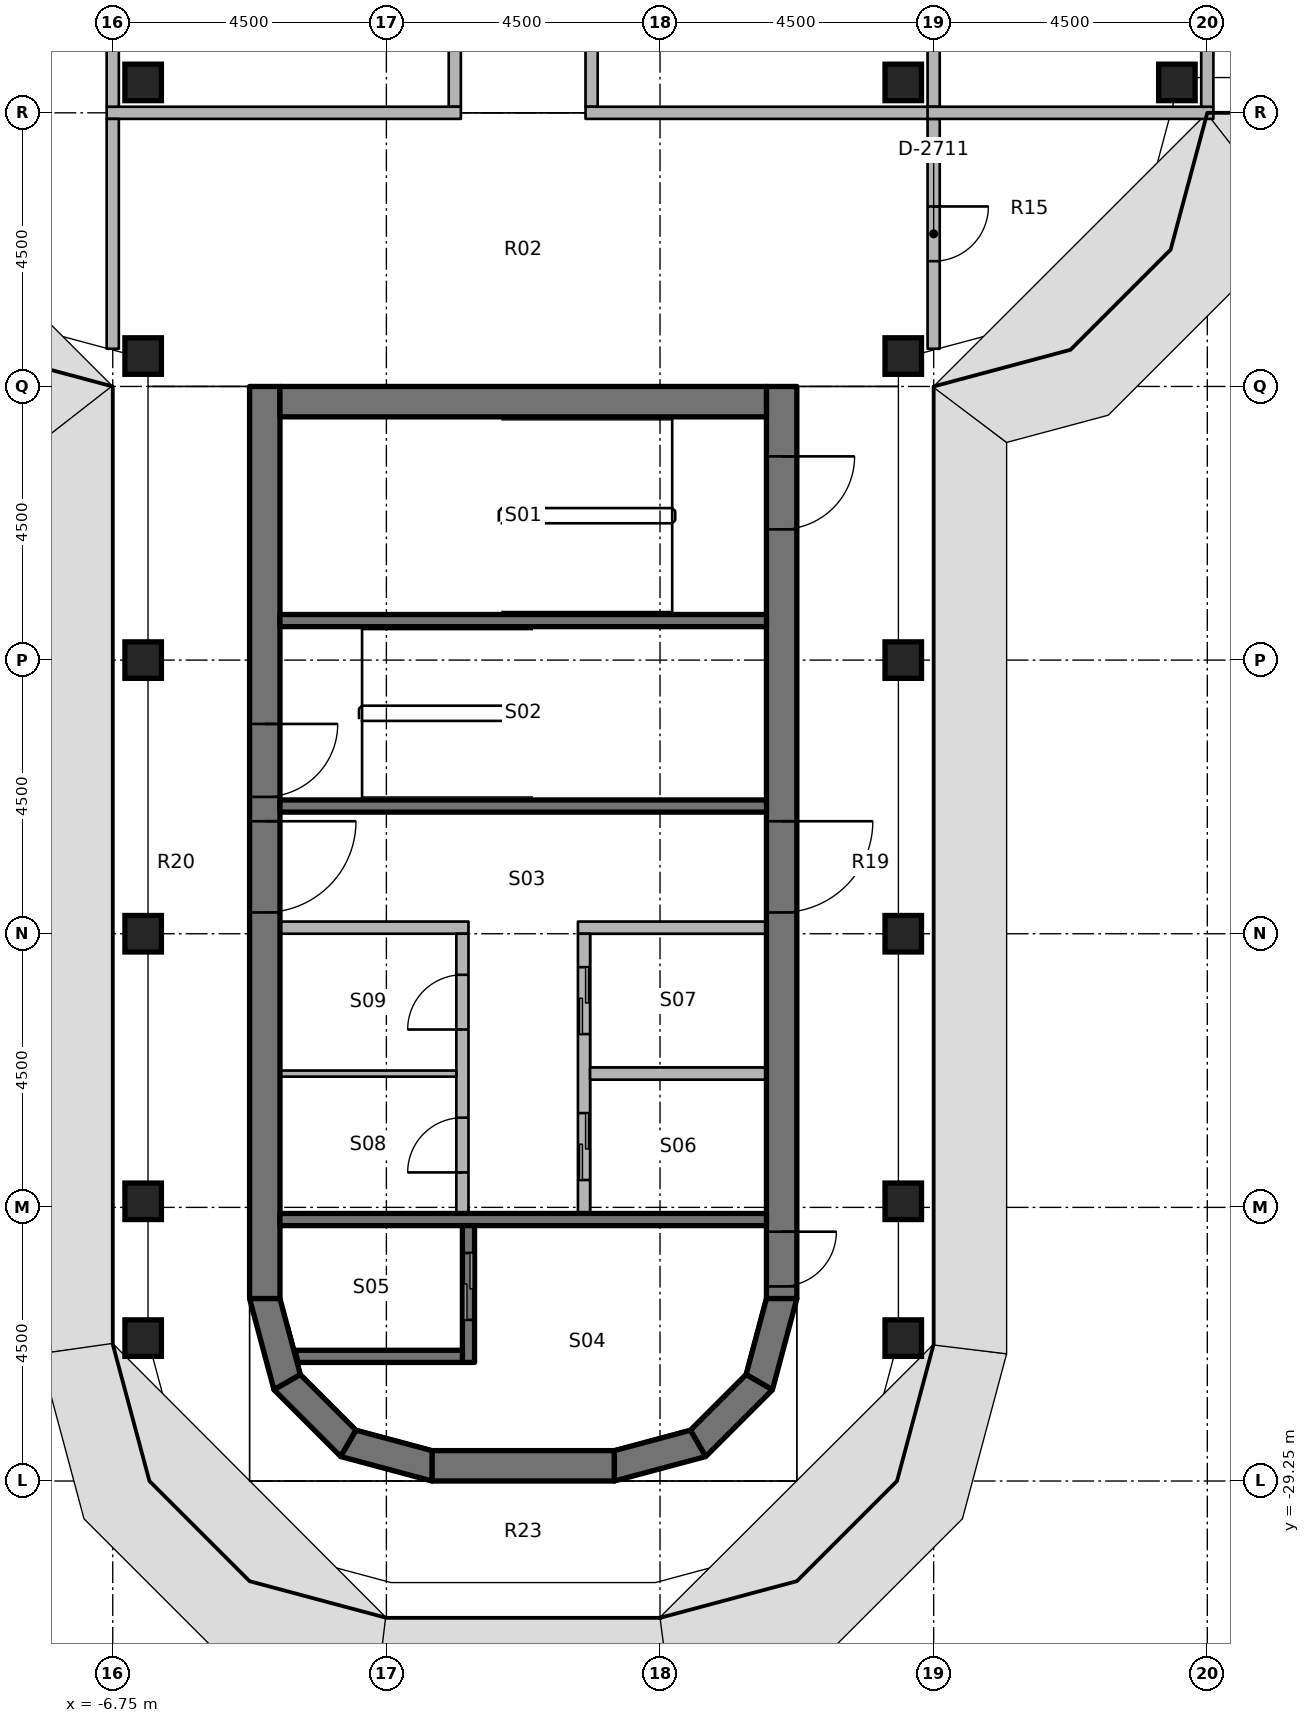
"""IFC4 building model, lengths in metres.
Left out: names, types, materials, properties, quantities, classifications, styles, units other than length and angle.
Written with IfcOpenShell. Run it as: python <this file> out.ifc"""

import sys

from ifc_helpers import new_model, si_unit, direction, frame, frame_2d, origin, origin_2d, place, context, subcontext, project, spatial, polyline, rectangle, outline, extrude, element, fill, save


model = new_model("IFC4")
c1 = context("Model", 3, precision=1e-05, world=origin(), true_north=direction((0.0, 1.0)))
c2 = subcontext(c1, "Body", "Model", "MODEL_VIEW")
j1 = project(units=[si_unit("LENGTHUNIT", "METRE"), si_unit("PLANEANGLEUNIT", "RADIAN")], contexts=[c1])
p1 = place(None, origin())
s1 = spatial("IfcSite", under=j1, at=p1, CompositionType="ELEMENT")
p2 = place(p1, origin())
s2 = spatial("IfcBuilding", under=s1, at=p2, CompositionType="ELEMENT")
p3 = place(p2, frame((0.0, 0.0, 253.6)))
s3 = spatial("IfcBuildingStorey", under=s2, at=p3, CompositionType="ELEMENT", Elevation=253.6)
for number, where, z_axis, x_axis in (
    (1, (-6.25, -26.9, 0.0), (0.0, 0.0, 1.0), (1.0, 0.0, 0.0)),
    (2, (-6.25, -24.65, 0.0), (0.0, 0.0, 1.0), (1.0, 0.0, 0.0)),
    (3, (-6.25, -20.25, 0.0), (0.0, 0.0, 1.0), (1.0, 0.0, 0.0)),
    (4, (-6.25, -15.75, 0.0), (0.0, 0.0, 1.0), (1.0, 0.0, 0.0)),
    (5, (-6.25, -10.75, 0.0), (0.0, 0.0, 1.0), (1.0, 0.0, 0.0)),
    (6, (-6.25, -6.25, 0.0), (0.0, 0.0, 1.0), (1.0, 0.0, 0.0)),
    (7, (6.25, -26.9, 0.0), (0.0, 0.0, 1.0), (1.0, 0.0, 0.0)),
    (8, (6.25, -24.65, 0.0), (0.0, 0.0, 1.0), (1.0, 0.0, 0.0)),
    (9, (6.25, -20.25, 0.0), (0.0, 0.0, 1.0), (1.0, 0.0, 0.0)),
    (10, (6.25, -15.75, 0.0), (0.0, 0.0, 1.0), (1.0, 0.0, 0.0)),
    (11, (6.25, -10.75, 0.0), (0.0, 0.0, 1.0), (1.0, 0.0, 0.0)),
    (12, (6.25, -6.25, 0.0), (0.0, 0.0, 1.0), (1.0, 0.0, 0.0)),
    (13, (10.75, -6.25, 0.0), (0.0, 0.0, 1.0), (1.0, 0.0, 0.0)),
):
    element("IfcColumn", number, at=place(p3, frame(where, z_axis=z_axis, x_axis=x_axis)), inside=s3, PredefinedType="COLUMN", context=c2, shape_type="SweptSolid", body=[
        extrude(rectangle(XDim=0.6, YDim=0.6, at=origin_2d()), origin(), (0.0, 0.0, 1.0), 3.65),
    ])
p4 = place(p3, frame((-4.25, -11.25, 0.0), z_axis=(0.0, 0.0, 1.0), x_axis=(0.0, -1.0, 0.0)))
e14 = element("IfcWall", 14, at=p4, inside=s3, PredefinedType="SHEAR", context=c2, shape_type="SweptSolid", body=[
    extrude(rectangle(XDim=15.0, YDim=0.5, at=frame_2d((7.5, 0.0))), origin(), (0.0, 0.0, 1.0), 3.8),
])
p5 = place(p4, frame((7.15, 0.0, 0.0)))
e15 = element("IfcOpeningElement", 15, at=p5, cuts=e14, PredefinedType="OPENING", context=c2, shape_type="SweptSolid", body=[
    extrude(rectangle(XDim=1.5, YDim=2.3, at=frame_2d((0.75, 1.15))), frame((0.0, 0.26, 0.0), z_axis=(0.0, -1.0, 0.0), x_axis=(1.0, 0.0, 0.0)), (0.0, 0.0, 1.0), 0.52),
])
p6 = place(p4, frame((5.55, 0.0, 0.0)))
e16 = element("IfcOpeningElement", 16, at=p6, cuts=e14, PredefinedType="OPENING", context=c2, shape_type="SweptSolid", body=[
    extrude(rectangle(XDim=1.2, YDim=2.1, at=frame_2d((0.6, 1.05))), frame((0.0, 0.26, 0.0), z_axis=(0.0, -1.0, 0.0), x_axis=(1.0, 0.0, 0.0)), (0.0, 0.0, 1.0), 0.52),
])
p7 = place(p3, frame((4.25, -11.25, 0.0), z_axis=(0.0, 0.0, 1.0), x_axis=(0.0, -1.0, 0.0)))
e17 = element("IfcWall", 17, at=p7, inside=s3, PredefinedType="SHEAR", context=c2, shape_type="SweptSolid", body=[
    extrude(rectangle(XDim=15.0, YDim=0.5, at=frame_2d((7.5, 0.0))), origin(), (0.0, 0.0, 1.0), 3.8),
])
p8 = place(p7, frame((7.15, 0.0, 0.0)))
e18 = element("IfcOpeningElement", 18, at=p8, cuts=e17, PredefinedType="OPENING", context=c2, shape_type="SweptSolid", body=[
    extrude(rectangle(XDim=1.5, YDim=2.3, at=frame_2d((0.75, 1.15))), frame((0.0, 0.26, 0.0), z_axis=(0.0, -1.0, 0.0), x_axis=(1.0, 0.0, 0.0)), (0.0, 0.0, 1.0), 0.52),
])
p9 = place(p7, frame((13.9, 0.0, 0.0)))
e19 = element("IfcOpeningElement", 19, at=p9, cuts=e17, PredefinedType="OPENING", context=c2, shape_type="SweptSolid", body=[
    extrude(rectangle(XDim=0.9, YDim=2.1, at=frame_2d((0.45, 1.05))), frame((0.0, 0.26, 0.0), z_axis=(0.0, -1.0, 0.0), x_axis=(1.0, 0.0, 0.0)), (0.0, 0.0, 1.0), 0.52),
])
p10 = place(p7, frame((1.15, 0.0, 0.0)))
e20 = element("IfcOpeningElement", 20, at=p10, cuts=e17, PredefinedType="OPENING", context=c2, shape_type="SweptSolid", body=[
    extrude(rectangle(XDim=1.2, YDim=2.1, at=frame_2d((0.6, 1.05))), frame((0.0, 0.26, 0.0), z_axis=(0.0, -1.0, 0.0), x_axis=(1.0, 0.0, 0.0)), (0.0, 0.0, 1.0), 0.52),
])
p11 = place(p3, frame((-4.0, -11.5, 0.0), z_axis=(0.0, 0.0, 1.0), x_axis=(1.0, 0.0, 0.0)))
e21 = element("IfcWall", 21, at=p11, inside=s3, PredefinedType="SHEAR", context=c2, shape_type="SweptSolid", body=[
    extrude(rectangle(XDim=8.0, YDim=0.5, at=frame_2d((4.0, 0.0))), origin(), (0.0, 0.0, 1.0), 3.8),
])
p12 = place(p3, frame((-1.5, -29.0, 0.0), z_axis=(0.0, 0.0, 1.0), x_axis=(1.0, 0.0, 0.0)))
e22 = element("IfcWall", 22, at=p12, inside=s3, PredefinedType="SHEAR", context=c2, shape_type="SweptSolid", body=[
    extrude(rectangle(XDim=3.0, YDim=0.5, at=frame_2d((1.5, 0.0))), origin(), (0.0, 0.0, 1.0), 3.8),
])
p13 = place(p3, origin())
e23 = element("IfcWall", 23, at=p13, inside=s3, PredefinedType="SHEAR", context=c2, shape_type="SweptSolid", body=[
    extrude(outline(polyline([(-4.5, -26.25), (-4.098, -27.75), (-3.665, -27.5), (-4.0, -26.25), (-4.5, -26.25)])), origin(), (0.0, 0.0, 1.0), 3.8),
])
p14 = place(p3, origin())
e24 = element("IfcWall", 24, at=p14, inside=s3, PredefinedType="SHEAR", context=c2, shape_type="SweptSolid", body=[
    extrude(outline(polyline([(-4.098, -27.75), (-3.0, -28.848), (-2.75, -28.415), (-3.665, -27.5), (-4.098, -27.75)])), origin(), (0.0, 0.0, 1.0), 3.8),
])
p15 = place(p3, origin())
e25 = element("IfcWall", 25, at=p15, inside=s3, PredefinedType="SHEAR", context=c2, shape_type="SweptSolid", body=[
    extrude(outline(polyline([(-3.0, -28.848), (-1.5, -29.25), (-1.5, -28.75), (-2.75, -28.415), (-3.0, -28.848)])), origin(), (0.0, 0.0, 1.0), 3.8),
])
p16 = place(p3, origin())
e26 = element("IfcWall", 26, at=p16, inside=s3, PredefinedType="SHEAR", context=c2, shape_type="SweptSolid", body=[
    extrude(outline(polyline([(4.5, -26.25), (4.098, -27.75), (3.665, -27.5), (4.0, -26.25), (4.5, -26.25)])), origin(), (0.0, 0.0, 1.0), 3.8),
])
p17 = place(p3, origin())
e27 = element("IfcWall", 27, at=p17, inside=s3, PredefinedType="SHEAR", context=c2, shape_type="SweptSolid", body=[
    extrude(outline(polyline([(4.098, -27.75), (3.0, -28.848), (2.75, -28.415), (3.665, -27.5), (4.098, -27.75)])), origin(), (0.0, 0.0, 1.0), 3.8),
])
p18 = place(p3, origin())
e28 = element("IfcWall", 28, at=p18, inside=s3, PredefinedType="SHEAR", context=c2, shape_type="SweptSolid", body=[
    extrude(outline(polyline([(3.0, -28.848), (1.5, -29.25), (1.5, -28.75), (2.75, -28.415), (3.0, -28.848)])), origin(), (0.0, 0.0, 1.0), 3.8),
])
p19 = place(p3, frame((4.0, -24.95, 0.0), z_axis=(0.0, 0.0, 1.0), x_axis=(-1.0, 0.0, 0.0)))
e29 = element("IfcWall", 29, at=p19, inside=s3, PredefinedType="SHEAR", context=c2, shape_type="SweptSolid", body=[
    extrude(rectangle(XDim=8.0, YDim=0.2, at=frame_2d((4.0, 0.0))), origin(), (0.0, 0.0, 1.0), 3.65),
])
p20 = place(p3, frame((-0.9, -27.3, 0.0), z_axis=(0.0, 0.0, 1.0), x_axis=(0.0, 1.0, 0.0)))
e30 = element("IfcWall", 30, at=p20, inside=s3, PredefinedType="SHEAR", context=c2, shape_type="SweptSolid", body=[
    extrude(rectangle(XDim=2.25, YDim=0.2, at=frame_2d((1.125, 0.0))), origin(), (0.0, 0.0, 1.0), 3.65),
])
p21 = place(p20, frame((0.7, 0.0, 0.0)))
e31 = element("IfcOpeningElement", 31, at=p21, cuts=e30, PredefinedType="OPENING", context=c2, shape_type="SweptSolid", body=[
    extrude(rectangle(XDim=1.1, YDim=2.3, at=frame_2d((0.55, 1.15))), frame((0.0, 0.11, 0.0), z_axis=(0.0, -1.0, 0.0), x_axis=(1.0, 0.0, 0.0)), (0.0, 0.0, 1.0), 0.22),
])
p22 = place(p3, origin())
e32 = element("IfcWall", 32, at=p22, inside=s3, PredefinedType="SHEAR", context=c2, shape_type="SweptSolid", body=[
    extrude(outline(polyline([(-1.0, -27.1), (-3.755, -27.1), (-3.701, -27.3), (-1.0, -27.3), (-1.0, -27.1)])), origin(), (0.0, 0.0, 1.0), 3.65),
])
for number, where, z_axis, x_axis in (
    (33, (4.0, -18.15, 0.0), (0.0, 0.0, 1.0), (-1.0, 0.0, 0.0)),
    (34, (4.0, -15.1, 0.0), (0.0, 0.0, 1.0), (-1.0, 0.0, 0.0)),
):
    element("IfcWall", number, at=place(p3, frame(where, z_axis=z_axis, x_axis=x_axis)), inside=s3, PredefinedType="SHEAR", context=c2, shape_type="SweptSolid", body=[
        extrude(rectangle(XDim=8.0, YDim=0.2, at=frame_2d((4.0, 0.0))), origin(), (0.0, 0.0, 1.0), 3.65),
    ])
p23 = place(p3, frame((4.0, -20.15, 0.0), z_axis=(0.0, 0.0, 1.0), x_axis=(-1.0, 0.0, 0.0)))
e35 = element("IfcWall", 35, at=p23, inside=s3, PredefinedType="PARTITIONING", context=c2, shape_type="SweptSolid", body=[
    extrude(rectangle(XDim=3.1, YDim=0.2, at=frame_2d((1.55, 0.0))), origin(), (0.0, 0.0, 1.0), 3.65),
])
p24 = place(p3, frame((1.0, -24.85, 0.0), z_axis=(0.0, 0.0, 1.0), x_axis=(0.0, 1.0, 0.0)))
e36 = element("IfcWall", 36, at=p24, inside=s3, PredefinedType="PARTITIONING", context=c2, shape_type="SweptSolid", body=[
    extrude(rectangle(XDim=4.6, YDim=0.2, at=frame_2d((2.3, 0.0))), origin(), (0.0, 0.0, 1.0), 3.65),
])
p25 = place(p24, frame((0.55, 0.0, 0.0)))
e37 = element("IfcOpeningElement", 37, at=p25, cuts=e36, PredefinedType="OPENING", context=c2, shape_type="SweptSolid", body=[
    extrude(rectangle(XDim=1.1, YDim=2.3, at=frame_2d((0.55, 1.15))), frame((0.0, 0.11, 0.0), z_axis=(0.0, -1.0, 0.0), x_axis=(1.0, 0.0, 0.0)), (0.0, 0.0, 1.0), 0.22),
])
p26 = place(p24, frame((2.95, 0.0, 0.0)))
e38 = element("IfcOpeningElement", 38, at=p26, cuts=e36, PredefinedType="OPENING", context=c2, shape_type="SweptSolid", body=[
    extrude(rectangle(XDim=1.1, YDim=2.3, at=frame_2d((0.55, 1.15))), frame((0.0, 0.11, 0.0), z_axis=(0.0, -1.0, 0.0), x_axis=(1.0, 0.0, 0.0)), (0.0, 0.0, 1.0), 0.22),
])
p27 = place(p3, frame((-0.9, -20.15, 0.0), z_axis=(0.0, 0.0, 1.0), x_axis=(-1.0, 0.0, 0.0)))
e39 = element("IfcWall", 39, at=p27, inside=s3, PredefinedType="PARTITIONING", context=c2, shape_type="SweptSolid", body=[
    extrude(rectangle(XDim=3.1, YDim=0.2, at=frame_2d((1.55, 0.0))), origin(), (0.0, 0.0, 1.0), 3.65),
])
p28 = place(p3, frame((-1.0, -24.85, 0.0), z_axis=(0.0, 0.0, 1.0), x_axis=(0.0, 1.0, 0.0)))
e40 = element("IfcWall", 40, at=p28, inside=s3, PredefinedType="PARTITIONING", context=c2, shape_type="SweptSolid", body=[
    extrude(rectangle(XDim=4.6, YDim=0.2, at=frame_2d((2.3, 0.0))), origin(), (0.0, 0.0, 1.0), 3.65),
])
p29 = place(p28, frame((0.675, 0.0, 0.0)))
e41 = element("IfcOpeningElement", 41, at=p29, cuts=e40, PredefinedType="OPENING", context=c2, shape_type="SweptSolid", body=[
    extrude(rectangle(XDim=0.9, YDim=2.1, at=frame_2d((0.45, 1.05))), frame((0.0, 0.11, 0.0), z_axis=(0.0, -1.0, 0.0), x_axis=(1.0, 0.0, 0.0)), (0.0, 0.0, 1.0), 0.22),
])
p30 = place(p28, frame((3.025, 0.0, 0.0)))
e42 = element("IfcOpeningElement", 42, at=p30, cuts=e40, PredefinedType="OPENING", context=c2, shape_type="SweptSolid", body=[
    extrude(rectangle(XDim=0.9, YDim=2.1, at=frame_2d((0.45, 1.05))), frame((0.0, 0.11, 0.0), z_axis=(0.0, -1.0, 0.0), x_axis=(1.0, 0.0, 0.0)), (0.0, 0.0, 1.0), 0.22),
])
p31 = place(p3, frame((4.0, -22.55, 0.0), z_axis=(0.0, 0.0, 1.0), x_axis=(-1.0, 0.0, 0.0)))
e43 = element("IfcWall", 43, at=p31, inside=s3, PredefinedType="PARTITIONING", context=c2, shape_type="SweptSolid", body=[
    extrude(rectangle(XDim=2.9, YDim=0.2, at=frame_2d((1.45, 0.0))), origin(), (0.0, 0.0, 1.0), 3.65),
])
p32 = place(p3, frame((-1.1, -22.55, 0.0), z_axis=(0.0, 0.0, 1.0), x_axis=(-1.0, 0.0, 0.0)))
e44 = element("IfcWall", 44, at=p32, inside=s3, PredefinedType="PARTITIONING", context=c2, shape_type="SweptSolid", body=[
    extrude(rectangle(XDim=2.9, YDim=0.1, at=frame_2d((1.45, 0.0))), origin(), (0.0, 0.0, 1.0), 3.65),
])
for number, where, z_axis, x_axis in (
    (45, (1.125, -6.65, 0.0), (0.0, 0.0, 1.0), (0.0, 1.0, 0.0)),
    (46, (-1.125, -6.65, 0.0), (0.0, 0.0, 1.0), (0.0, 1.0, 0.0)),
):
    element("IfcWall", number, at=place(p3, frame(where, z_axis=z_axis, x_axis=x_axis)), inside=s3, PredefinedType="PARTITIONING", context=c2, shape_type="SweptSolid", body=[
        extrude(rectangle(XDim=6.55, YDim=0.2, at=frame_2d((3.275, 0.0))), origin(), (0.0, 0.0, 1.0), 2.75),
    ])
p33 = place(p3, frame((1.025, -6.75, 0.0), z_axis=(0.0, 0.0, 1.0), x_axis=(1.0, 0.0, 0.0)))
e47 = element("IfcWall", 47, at=p33, inside=s3, PredefinedType="PARTITIONING", context=c2, shape_type="SweptSolid", body=[
    extrude(rectangle(XDim=5.825, YDim=0.2, at=frame_2d((2.913, 0.0))), origin(), (0.0, 0.0, 1.0), 2.75),
])
p34 = place(p3, frame((6.75, -6.85, 0.0), z_axis=(0.0, 0.0, 1.0), x_axis=(0.0, -1.0, 0.0)))
e48 = element("IfcWall", 48, at=p34, inside=s3, PredefinedType="PARTITIONING", context=c2, shape_type="SweptSolid", body=[
    extrude(rectangle(XDim=3.78, YDim=0.2, at=frame_2d((1.89, 0.0))), origin(), (0.0, 0.0, 1.0), 2.75),
])
p35 = place(p34, frame((1.44, 0.0, 0.0)))
e49 = element("IfcOpeningElement", 49, at=p35, cuts=e48, PredefinedType="OPENING", context=c2, shape_type="SweptSolid", body=[
    extrude(rectangle(XDim=0.9, YDim=2.1, at=frame_2d((0.45, 1.05))), frame((0.0, 0.11, 0.0), z_axis=(0.0, -1.0, 0.0), x_axis=(1.0, 0.0, 0.0)), (0.0, 0.0, 1.0), 0.22),
])
p36 = place(p3, frame((-6.85, -6.75, 0.0), z_axis=(0.0, 0.0, 1.0), x_axis=(1.0, 0.0, 0.0)))
e50 = element("IfcWall", 50, at=p36, inside=s3, PredefinedType="PARTITIONING", context=c2, shape_type="SweptSolid", body=[
    extrude(rectangle(XDim=5.825, YDim=0.2, at=frame_2d((2.913, 0.0))), origin(), (0.0, 0.0, 1.0), 2.75),
])
p37 = place(p3, frame((-6.75, -10.63, 0.0), z_axis=(0.0, 0.0, 1.0), x_axis=(0.0, 1.0, 0.0)))
e51 = element("IfcWall", 51, at=p37, inside=s3, PredefinedType="PARTITIONING", context=c2, shape_type="SweptSolid", body=[
    extrude(rectangle(XDim=3.78, YDim=0.2, at=frame_2d((1.89, 0.0))), origin(), (0.0, 0.0, 1.0), 2.75),
])
p38 = place(p3, frame((6.75, -6.65, 0.0), z_axis=(0.0, 0.0, 1.0), x_axis=(0.0, 1.0, 0.0)))
e52 = element("IfcWall", 52, at=p38, inside=s3, PredefinedType="PARTITIONING", context=c2, shape_type="SweptSolid", body=[
    extrude(rectangle(XDim=6.55, YDim=0.2, at=frame_2d((3.275, 0.0))), origin(), (0.0, 0.0, 1.0), 2.75),
])
p39 = place(p3, frame((6.65, -6.75, 0.0), z_axis=(0.0, 0.0, 1.0), x_axis=(1.0, 0.0, 0.0)))
e53 = element("IfcWall", 53, at=p39, inside=s3, PredefinedType="PARTITIONING", context=c2, shape_type="SweptSolid", body=[
    extrude(rectangle(XDim=4.7, YDim=0.2, at=frame_2d((2.35, 0.0))), origin(), (0.0, 0.0, 1.0), 2.75),
])
for number, where, z_axis, x_axis in (
    (54, (11.25, -6.65, 0.0), (0.0, 0.0, 1.0), (0.0, 1.0, 0.0)),
    (55, (-6.75, -6.65, 0.0), (0.0, 0.0, 1.0), (0.0, 1.0, 0.0)),
):
    element("IfcWall", number, at=place(p3, frame(where, z_axis=z_axis, x_axis=x_axis)), inside=s3, PredefinedType="PARTITIONING", context=c2, shape_type="SweptSolid", body=[
        extrude(rectangle(XDim=6.55, YDim=0.2, at=frame_2d((3.275, 0.0))), origin(), (0.0, 0.0, 1.0), 2.75),
    ])
p40 = place(p8, origin())
e56 = element("IfcDoor", 56, at=p40, inside=s3, OperationType="DOUBLE_DOOR_SINGLE_SWING", PredefinedType="DOOR", context=c2, shape_type="SweptSolid", body=[
    extrude(rectangle(XDim=1.5, YDim=2.3, at=frame_2d((0.75, 1.15))), frame((0.0, 0.025, 0.0), z_axis=(0.0, -1.0, 0.0), x_axis=(1.0, 0.0, 0.0)), (0.0, 0.0, 1.0), 0.05),
])
fill(e18, e56)
p41 = place(p5, origin())
e57 = element("IfcDoor", 57, at=p41, inside=s3, OperationType="DOUBLE_DOOR_SINGLE_SWING", PredefinedType="DOOR", context=c2, shape_type="SweptSolid", body=[
    extrude(rectangle(XDim=1.5, YDim=2.3, at=frame_2d((0.75, 1.15))), frame((0.0, 0.025, 0.0), z_axis=(0.0, -1.0, 0.0), x_axis=(1.0, 0.0, 0.0)), (0.0, 0.0, 1.0), 0.05),
])
fill(e15, e57)
p42 = place(p9, origin())
e58 = element("IfcDoor", 58, at=p42, inside=s3, OperationType="SINGLE_SWING_LEFT", PredefinedType="DOOR", context=c2, shape_type="SweptSolid", body=[
    extrude(rectangle(XDim=0.9, YDim=2.1, at=frame_2d((0.45, 1.05))), frame((0.0, 0.025, 0.0), z_axis=(0.0, -1.0, 0.0), x_axis=(1.0, 0.0, 0.0)), (0.0, 0.0, 1.0), 0.05),
])
fill(e19, e58)
p43 = place(p6, origin())
e59 = element("IfcDoor", 59, at=p43, inside=s3, OperationType="SINGLE_SWING_LEFT", PredefinedType="DOOR", context=c2, shape_type="SweptSolid", body=[
    extrude(rectangle(XDim=1.2, YDim=2.1, at=frame_2d((0.6, 1.05))), frame((0.0, 0.025, 0.0), z_axis=(0.0, -1.0, 0.0), x_axis=(1.0, 0.0, 0.0)), (0.0, 0.0, 1.0), 0.05),
])
fill(e16, e59)
p44 = place(p10, origin())
e60 = element("IfcDoor", 60, at=p44, inside=s3, OperationType="SINGLE_SWING_RIGHT", PredefinedType="DOOR", context=c2, shape_type="SweptSolid", body=[
    extrude(rectangle(XDim=1.2, YDim=2.1, at=frame_2d((0.6, 1.05))), frame((0.0, 0.025, 0.0), z_axis=(0.0, -1.0, 0.0), x_axis=(1.0, 0.0, 0.0)), (0.0, 0.0, 1.0), 0.05),
])
fill(e20, e60)
p45 = place(p21, origin())
e61 = element("IfcDoor", 61, at=p45, inside=s3, OperationType="DOUBLE_DOOR_SLIDING", PredefinedType="DOOR", context=c2, shape_type="SweptSolid", body=[
    extrude(rectangle(XDim=1.1, YDim=2.3, at=frame_2d((0.55, 1.15))), frame((0.0, 0.025, 0.0), z_axis=(0.0, -1.0, 0.0), x_axis=(1.0, 0.0, 0.0)), (0.0, 0.0, 1.0), 0.05),
])
fill(e31, e61)
p46 = place(p25, origin())
e62 = element("IfcDoor", 62, at=p46, inside=s3, OperationType="DOUBLE_DOOR_SLIDING", PredefinedType="DOOR", context=c2, shape_type="SweptSolid", body=[
    extrude(rectangle(XDim=1.1, YDim=2.3, at=frame_2d((0.55, 1.15))), frame((0.0, 0.025, 0.0), z_axis=(0.0, -1.0, 0.0), x_axis=(1.0, 0.0, 0.0)), (0.0, 0.0, 1.0), 0.05),
])
fill(e37, e62)
p47 = place(p26, origin())
e63 = element("IfcDoor", 63, at=p47, inside=s3, OperationType="DOUBLE_DOOR_SLIDING", PredefinedType="DOOR", context=c2, shape_type="SweptSolid", body=[
    extrude(rectangle(XDim=1.1, YDim=2.3, at=frame_2d((0.55, 1.15))), frame((0.0, 0.025, 0.0), z_axis=(0.0, -1.0, 0.0), x_axis=(1.0, 0.0, 0.0)), (0.0, 0.0, 1.0), 0.05),
])
fill(e38, e63)
p48 = place(p29, origin())
e64 = element("IfcDoor", 64, at=p48, inside=s3, OperationType="SINGLE_SWING_LEFT", PredefinedType="DOOR", context=c2, shape_type="SweptSolid", body=[
    extrude(rectangle(XDim=0.9, YDim=2.1, at=frame_2d((0.45, 1.05))), frame((0.0, 0.025, 0.0), z_axis=(0.0, -1.0, 0.0), x_axis=(1.0, 0.0, 0.0)), (0.0, 0.0, 1.0), 0.05),
])
fill(e41, e64)
p49 = place(p30, origin())
e65 = element("IfcDoor", 65, at=p49, inside=s3, OperationType="SINGLE_SWING_LEFT", PredefinedType="DOOR", context=c2, shape_type="SweptSolid", body=[
    extrude(rectangle(XDim=0.9, YDim=2.1, at=frame_2d((0.45, 1.05))), frame((0.0, 0.025, 0.0), z_axis=(0.0, -1.0, 0.0), x_axis=(1.0, 0.0, 0.0)), (0.0, 0.0, 1.0), 0.05),
])
fill(e42, e65)
p50 = place(p35, origin())
e66 = element("IfcDoor", 66, at=p50, inside=s3, OperationType="SINGLE_SWING_LEFT", PredefinedType="DOOR", context=c2, shape_type="SweptSolid", body=[
    extrude(rectangle(XDim=0.9, YDim=2.1, at=frame_2d((0.45, 1.05))), frame((0.0, 0.025, 0.0), z_axis=(0.0, -1.0, 0.0), x_axis=(1.0, 0.0, 0.0)), (0.0, 0.0, 1.0), 0.05),
])
fill(e49, e66)
save(model, sys.argv[1])
